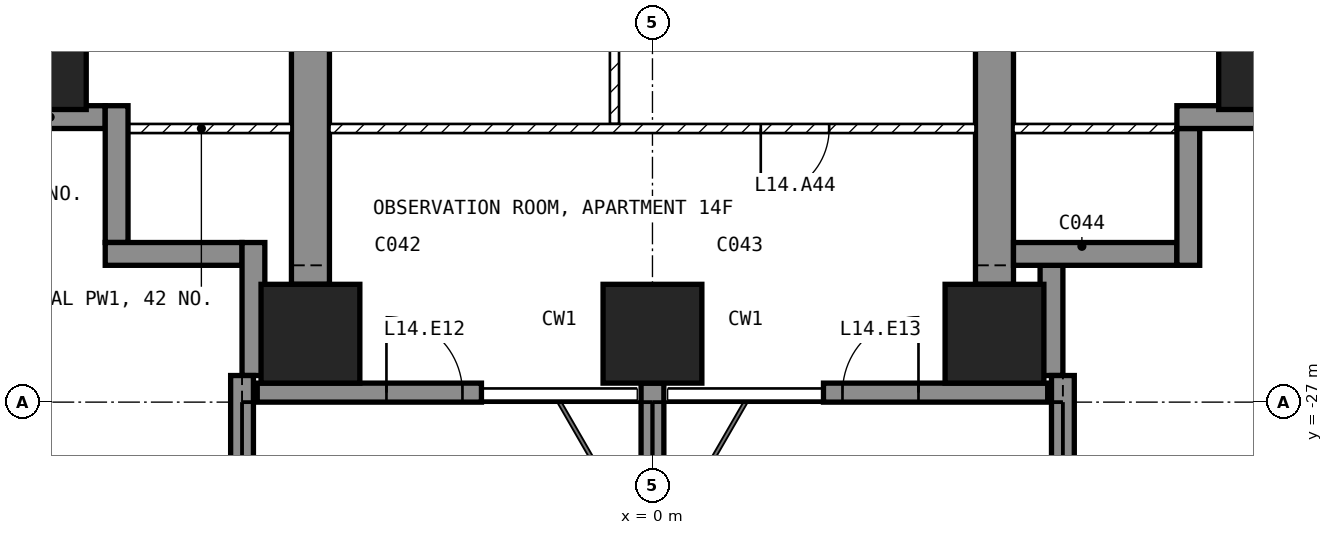
"""IFC4 building model, lengths in metres.
Left out: names, types, materials, properties, quantities, classifications, styles, units other than length and angle.
Written with IfcOpenShell. Run it as: python <this file> out.ifc"""

import sys

from ifc_helpers import new_model, si_unit, direction, frame, frame_2d, origin, origin_2d, place, context, subcontext, project, spatial, polyline, rectangle, outline, extrude, element, fill, save


model = new_model("IFC4")
c1 = context("Model", 3, precision=1e-05, world=origin(), true_north=direction((0.0, 1.0)))
c2 = subcontext(c1, "Body", "Model", "MODEL_VIEW")
j1 = project(units=[si_unit("LENGTHUNIT", "METRE"), si_unit("PLANEANGLEUNIT", "RADIAN")], contexts=[c1])
p1 = place(None, origin())
s1 = spatial("IfcSite", under=j1, at=p1, CompositionType="ELEMENT")
p2 = place(p1, origin())
s2 = spatial("IfcBuilding", under=s1, at=p2, CompositionType="ELEMENT")
p3 = place(p2, frame((0.0, 0.0, 68.0)))
s3 = spatial("IfcBuildingStorey", under=s2, at=p3, CompositionType="ELEMENT", Elevation=68.0)
for number, where, z_axis, x_axis in (
    (1, (-8.1, -22.5, -0.25), (0.0, 0.0, 1.0), (1.0, 0.0, 0.0)),
    (2, (-4.5, -26.1, -0.25), (0.0, 0.0, 1.0), (1.0, 0.0, 0.0)),
    (3, (0.0, -26.1, -0.25), (0.0, 0.0, 1.0), (1.0, 0.0, 0.0)),
    (4, (4.5, -26.1, -0.25), (0.0, 0.0, 1.0), (1.0, 0.0, 0.0)),
    (5, (8.1, -22.5, -0.25), (0.0, 0.0, 1.0), (1.0, 0.0, 0.0)),
):
    element("IfcColumn", number, at=place(p3, frame(where, z_axis=z_axis, x_axis=x_axis)), inside=s3, PredefinedType="COLUMN", context=c2, shape_type="SweptSolid", body=[
        extrude(rectangle(XDim=1.3, YDim=1.3, at=origin_2d()), origin(), (0.0, 0.0, 1.0), 3.5),
    ])
for number, where, z_axis, x_axis in (
    (6, (-4.75, -25.45, -0.25), (1.0, 0.0, 0.0), (0.0, 1.0, 0.0)),
    (7, (4.25, -25.45, -0.25), (1.0, 0.0, 0.0), (0.0, 1.0, 0.0)),
):
    element("IfcWall", number, at=place(p3, frame(where, z_axis=z_axis, x_axis=x_axis)), inside=s3, PredefinedType="SHEAR", context=c2, shape_type="SweptSolid", body=[
        extrude(outline(polyline([(0.0, 0.0), (4.15, 0.0), (4.15, 2.65), (6.55, 2.65), (6.55, 0.0), (11.95, 0.0), (11.95, 2.65), (14.35, 2.65), (14.35, 0.0), (16.45, 0.0), (16.45, 3.5), (0.0, 3.5), (0.0, 0.0)])), origin(), (0.0, 0.0, 1.0), 0.5),
    ])
p4 = place(p3, frame((-5.2, -26.875, 0.0), z_axis=(0.0, 0.0, 1.0), x_axis=(1.0, 0.0, 0.0)))
e8 = element("IfcWall", 8, at=p4, inside=s3, PredefinedType="SOLIDWALL", context=c2, shape_type="SweptSolid", body=[
    extrude(rectangle(XDim=2.95, YDim=0.25, at=frame_2d((1.475, 0.0))), origin(), (0.0, 0.0, 1.0), 3.25),
])
p5 = place(p4, frame((1.7, 0.0, 0.0)))
e9 = element("IfcOpeningElement", 9, at=p5, cuts=e8, PredefinedType="OPENING", context=c2, shape_type="SweptSolid", body=[
    extrude(rectangle(XDim=1.0, YDim=2.4, at=frame_2d((0.5, 1.2))), frame((0.0, 0.135, 0.0), z_axis=(0.0, -1.0, 0.0), x_axis=(1.0, 0.0, 0.0)), (0.0, 0.0, 1.0), 0.27),
])
p6 = place(p3, frame((2.25, -26.875, 0.0), z_axis=(0.0, 0.0, 1.0), x_axis=(1.0, 0.0, 0.0)))
e10 = element("IfcWall", 10, at=p6, inside=s3, PredefinedType="SOLIDWALL", context=c2, shape_type="SweptSolid", body=[
    extrude(rectangle(XDim=2.95, YDim=0.25, at=frame_2d((1.475, 0.0))), origin(), (0.0, 0.0, 1.0), 3.25),
])
p7 = place(p6, frame((0.25, 0.0, 0.0)))
e11 = element("IfcOpeningElement", 11, at=p7, cuts=e10, PredefinedType="OPENING", context=c2, shape_type="SweptSolid", body=[
    extrude(rectangle(XDim=1.0, YDim=2.4, at=frame_2d((0.5, 1.2))), frame((0.0, 0.135, 0.0), z_axis=(0.0, -1.0, 0.0), x_axis=(1.0, 0.0, 0.0)), (0.0, 0.0, 1.0), 0.27),
])
p8 = place(p3, frame((5.25, -26.65, 0.0), z_axis=(0.0, 0.0, 1.0), x_axis=(0.0, 1.0, 0.0)))
e12 = element("IfcWall", 12, at=p8, inside=s3, PredefinedType="SOLIDWALL", context=c2, shape_type="SweptSolid", body=[
    extrude(rectangle(XDim=1.45, YDim=0.3, at=frame_2d((0.725, 0.0))), origin(), (0.0, 0.0, 1.0), 3.25),
])
p9 = place(p3, frame((4.75, -25.05, 0.0), z_axis=(0.0, 0.0, 1.0), x_axis=(1.0, 0.0, 0.0)))
e13 = element("IfcWall", 13, at=p9, inside=s3, PredefinedType="SOLIDWALL", context=c2, shape_type="SweptSolid", body=[
    extrude(rectangle(XDim=2.15, YDim=0.3, at=frame_2d((1.075, 0.0))), origin(), (0.0, 0.0, 1.0), 3.25),
])
p10 = place(p3, frame((7.05, -25.2, 0.0), z_axis=(0.0, 0.0, 1.0), x_axis=(0.0, 1.0, 0.0)))
e14 = element("IfcWall", 14, at=p10, inside=s3, PredefinedType="SOLIDWALL", context=c2, shape_type="SweptSolid", body=[
    extrude(rectangle(XDim=1.8, YDim=0.3, at=frame_2d((0.9, 0.0))), origin(), (0.0, 0.0, 1.0), 3.25),
])
p11 = place(p3, frame((6.9, -23.25, 0.0), z_axis=(0.0, 0.0, 1.0), x_axis=(1.0, 0.0, 0.0)))
e15 = element("IfcWall", 15, at=p11, inside=s3, PredefinedType="SOLIDWALL", context=c2, shape_type="SweptSolid", body=[
    extrude(rectangle(XDim=1.75, YDim=0.3, at=frame_2d((0.875, 0.0))), origin(), (0.0, 0.0, 1.0), 3.25),
])
p12 = place(p3, frame((-8.65, -23.25, 0.0), z_axis=(0.0, 0.0, 1.0), x_axis=(1.0, 0.0, 0.0)))
e16 = element("IfcWall", 16, at=p12, inside=s3, PredefinedType="SOLIDWALL", context=c2, shape_type="SweptSolid", body=[
    extrude(rectangle(XDim=1.45, YDim=0.3, at=frame_2d((0.725, 0.0))), origin(), (0.0, 0.0, 1.0), 3.25),
])
p13 = place(p3, frame((-7.05, -23.1, 0.0), z_axis=(0.0, 0.0, 1.0), x_axis=(0.0, -1.0, 0.0)))
e17 = element("IfcWall", 17, at=p13, inside=s3, PredefinedType="SOLIDWALL", context=c2, shape_type="SweptSolid", body=[
    extrude(rectangle(XDim=1.8, YDim=0.3, at=frame_2d((0.9, 0.0))), origin(), (0.0, 0.0, 1.0), 3.25),
])
p14 = place(p3, frame((-7.2, -25.05, 0.0), z_axis=(0.0, 0.0, 1.0), x_axis=(1.0, 0.0, 0.0)))
e18 = element("IfcWall", 18, at=p14, inside=s3, PredefinedType="SOLIDWALL", context=c2, shape_type="SweptSolid", body=[
    extrude(rectangle(XDim=1.8, YDim=0.3, at=frame_2d((0.9, 0.0))), origin(), (0.0, 0.0, 1.0), 3.25),
])
p15 = place(p3, frame((-5.25, -24.9, 0.0), z_axis=(0.0, 0.0, 1.0), x_axis=(0.0, -1.0, 0.0)))
e19 = element("IfcWall", 19, at=p15, inside=s3, PredefinedType="SOLIDWALL", context=c2, shape_type="SweptSolid", body=[
    extrude(rectangle(XDim=1.75, YDim=0.3, at=frame_2d((0.875, 0.0))), origin(), (0.0, 0.0, 1.0), 3.25),
])
p16 = place(p3, frame((-5.4, -26.65, 0.0), z_axis=(0.0, 0.0, 1.0), x_axis=(0.0, -1.0, 0.0)))
e20 = element("IfcWall", 20, at=p16, inside=s3, PredefinedType="SOLIDWALL", context=c2, shape_type="SweptSolid", body=[
    extrude(rectangle(XDim=3.05, YDim=0.3, at=frame_2d((1.525, 0.0))), origin(), (0.0, 0.0, 1.0), 3.25),
])
p17 = place(p3, frame((0.0, -26.75, 0.0), z_axis=(0.0, 0.0, 1.0), x_axis=(0.0, -1.0, 0.0)))
e21 = element("IfcWall", 21, at=p17, inside=s3, PredefinedType="SOLIDWALL", context=c2, shape_type="SweptSolid", body=[
    extrude(rectangle(XDim=2.95, YDim=0.3, at=frame_2d((1.475, 0.0))), origin(), (0.0, 0.0, 1.0), 3.25),
])
p18 = place(p3, frame((5.4, -26.65, 0.0), z_axis=(0.0, 0.0, 1.0), x_axis=(0.0, -1.0, 0.0)))
e22 = element("IfcWall", 22, at=p18, inside=s3, PredefinedType="SOLIDWALL", context=c2, shape_type="SweptSolid", body=[
    extrude(rectangle(XDim=3.05, YDim=0.3, at=frame_2d((1.525, 0.0))), origin(), (0.0, 0.0, 1.0), 3.25),
])
p19 = place(p3, frame((-0.5, -23.34, 0.0), z_axis=(0.0, 0.0, 1.0), x_axis=(0.0, 1.0, 0.0)))
e23 = element("IfcWall", 23, at=p19, inside=s3, PredefinedType="PARTITIONING", context=c2, shape_type="SweptSolid", body=[
    extrude(rectangle(XDim=4.38, YDim=0.12, at=frame_2d((2.19, 0.0))), origin(), (0.0, 0.0, 1.0), 3.25),
])
p20 = place(p19, frame((1.74, 0.0, 0.0)))
e24 = element("IfcOpeningElement", 24, at=p20, cuts=e23, PredefinedType="OPENING", context=c2, shape_type="SweptSolid", body=[
    extrude(rectangle(XDim=0.9, YDim=2.1, at=frame_2d((0.45, 1.05))), frame((0.0, 0.07, 0.0), z_axis=(0.0, -1.0, 0.0), x_axis=(1.0, 0.0, 0.0)), (0.0, 0.0, 1.0), 0.14),
])
p21 = place(p3, frame((4.25, -23.4, 0.0), z_axis=(0.0, 0.0, 1.0), x_axis=(-1.0, 0.0, 0.0)))
e25 = element("IfcWall", 25, at=p21, inside=s3, PredefinedType="PARTITIONING", context=c2, shape_type="SweptSolid", body=[
    extrude(rectangle(XDim=8.5, YDim=0.12, at=frame_2d((4.25, 0.0))), origin(), (0.0, 0.0, 1.0), 3.25),
])
p22 = place(p21, frame((1.925, 0.0, 0.0)))
e26 = element("IfcOpeningElement", 26, at=p22, cuts=e25, PredefinedType="OPENING", context=c2, shape_type="SweptSolid", body=[
    extrude(rectangle(XDim=0.9, YDim=2.1, at=frame_2d((0.45, 1.05))), frame((0.0, 0.07, 0.0), z_axis=(0.0, -1.0, 0.0), x_axis=(1.0, 0.0, 0.0)), (0.0, 0.0, 1.0), 0.14),
])
for number, where, z_axis, x_axis in (
    (27, (7.12, -23.4, 0.0), (0.0, 0.0, 1.0), (-1.0, 0.0, 0.0)),
    (28, (-4.75, -23.4, 0.0), (0.0, 0.0, 1.0), (-1.0, 0.0, 0.0)),
):
    element("IfcWall", number, at=place(p3, frame(where, z_axis=z_axis, x_axis=x_axis)), inside=s3, PredefinedType="PARTITIONING", context=c2, shape_type="SweptSolid", body=[
        extrude(rectangle(XDim=2.37, YDim=0.12, at=frame_2d((1.185, 0.0))), origin(), (0.0, 0.0, 1.0), 3.25),
    ])
p23 = place(p5, origin())
e29 = element("IfcDoor", 29, at=p23, inside=s3, OperationType="SINGLE_SWING_LEFT", PredefinedType="DOOR", context=c2, shape_type="SweptSolid", body=[
    extrude(rectangle(XDim=1.0, YDim=2.4, at=frame_2d((0.5, 1.2))), frame((0.0, 0.025, 0.0), z_axis=(0.0, -1.0, 0.0), x_axis=(1.0, 0.0, 0.0)), (0.0, 0.0, 1.0), 0.05),
])
fill(e9, e29)
p24 = place(p7, origin())
e30 = element("IfcDoor", 30, at=p24, inside=s3, OperationType="SINGLE_SWING_RIGHT", PredefinedType="DOOR", context=c2, shape_type="SweptSolid", body=[
    extrude(rectangle(XDim=1.0, YDim=2.4, at=frame_2d((0.5, 1.2))), frame((0.0, 0.025, 0.0), z_axis=(0.0, -1.0, 0.0), x_axis=(1.0, 0.0, 0.0)), (0.0, 0.0, 1.0), 0.05),
])
fill(e11, e30)
p25 = place(p22, origin())
e31 = element("IfcDoor", 31, at=p25, inside=s3, OperationType="SINGLE_SWING_RIGHT", PredefinedType="DOOR", context=c2, shape_type="SweptSolid", body=[
    extrude(rectangle(XDim=0.9, YDim=2.1, at=frame_2d((0.45, 1.05))), frame((0.0, 0.025, 0.0), z_axis=(0.0, -1.0, 0.0), x_axis=(1.0, 0.0, 0.0)), (0.0, 0.0, 1.0), 0.05),
])
fill(e26, e31)
save(model, sys.argv[1])
